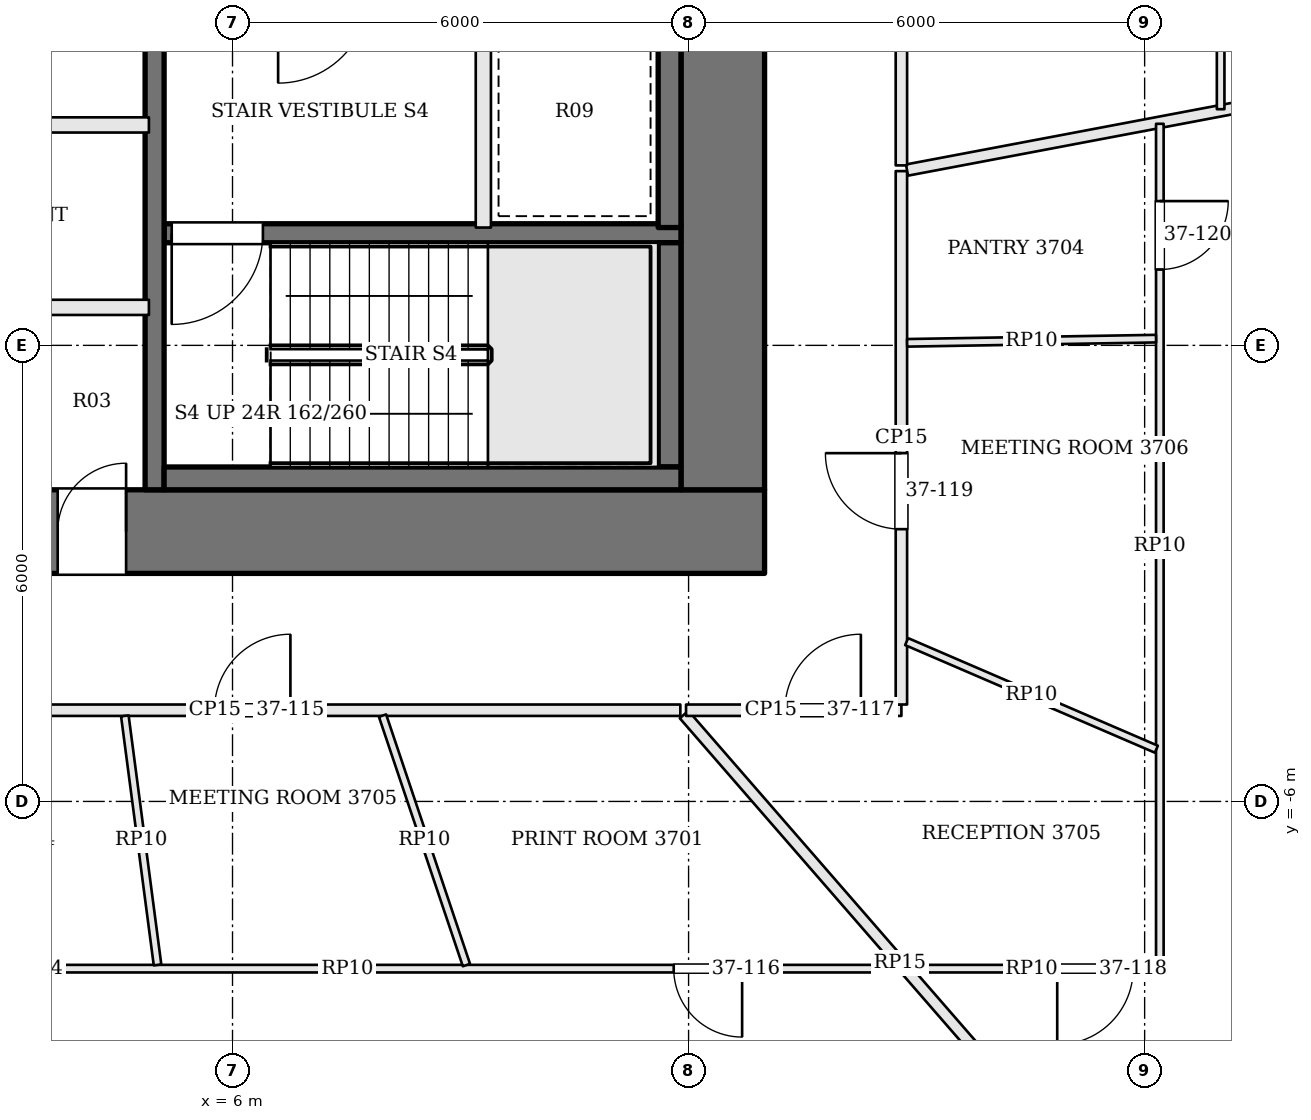
"""IFC4 building model, lengths in metres.
Left out: names, types, materials, properties, quantities, classifications, styles, units other than length and angle.
Written with IfcOpenShell. Run it as: python <this file> out.ifc"""

import sys

from ifc_helpers import new_model, si_unit, direction, frame, frame_2d, origin, place, context, subcontext, project, spatial, rectangle, extrude, element, fill, save


model = new_model("IFC4")
c1 = context("Model", 3, precision=1e-05, world=origin(), true_north=direction((0.0, 1.0)))
c2 = subcontext(c1, "Body", "Model", "MODEL_VIEW")
j1 = project(units=[si_unit("LENGTHUNIT", "METRE"), si_unit("PLANEANGLEUNIT", "RADIAN")], contexts=[c1])
p1 = place(None, origin())
s1 = spatial("IfcSite", under=j1, at=p1, CompositionType="ELEMENT")
p2 = place(p1, origin())
s2 = spatial("IfcBuilding", under=s1, at=p2, CompositionType="ELEMENT")
p3 = place(p2, frame((0.0, 0.0, 153.9)))
s3 = spatial("IfcBuildingStorey", under=s2, at=p3, CompositionType="ELEMENT", Elevation=153.9)
p4 = place(p3, frame((-13.0, -2.45, 0.0), z_axis=(0.0, 0.0, 1.0), x_axis=(1.0, 0.0, 0.0)))
e1 = element("IfcWall", 1, at=p4, inside=s3, PredefinedType="SHEAR", context=c2, shape_type="SweptSolid", body=[
    extrude(rectangle(XDim=26.0, YDim=1.1, at=frame_2d((13.0, 0.0))), origin(), (0.0, 0.0, 1.0), 3.9),
])
p5 = place(p4, frame((9.275, 0.0, 0.0)))
e2 = element("IfcOpeningElement", 2, at=p5, cuts=e1, PredefinedType="OPENING", context=c2, shape_type="SweptSolid", body=[
    extrude(rectangle(XDim=0.9, YDim=2.1, at=frame_2d((0.45, 1.05))), frame((0.0, 0.56, 0.0), z_axis=(0.0, -1.0, 0.0), x_axis=(1.0, 0.0, 0.0)), (0.0, 0.0, 1.0), 1.12),
])
p6 = place(p4, frame((12.525, 0.0, 0.0)))
e3 = element("IfcOpeningElement", 3, at=p6, cuts=e1, PredefinedType="OPENING", context=c2, shape_type="SweptSolid", body=[
    extrude(rectangle(XDim=0.9, YDim=2.1, at=frame_2d((0.45, 1.05))), frame((0.0, 0.56, 0.0), z_axis=(0.0, -1.0, 0.0), x_axis=(1.0, 0.0, 0.0)), (0.0, 0.0, 1.0), 1.12),
])
p7 = place(p4, frame((15.0, 0.0, 0.0)))
e4 = element("IfcOpeningElement", 4, at=p7, cuts=e1, PredefinedType="OPENING", context=c2, shape_type="SweptSolid", body=[
    extrude(rectangle(XDim=1.0, YDim=2.1, at=frame_2d((0.5, 1.05))), frame((0.0, 0.56, 0.0), z_axis=(0.0, -1.0, 0.0), x_axis=(1.0, 0.0, 0.0)), (0.0, 0.0, 1.0), 1.12),
])
p8 = place(p4, frame((16.7, 0.0, 0.0)))
e5 = element("IfcOpeningElement", 5, at=p8, cuts=e1, PredefinedType="OPENING", context=c2, shape_type="SweptSolid", body=[
    extrude(rectangle(XDim=0.9, YDim=2.1, at=frame_2d((0.45, 1.05))), frame((0.0, 0.56, 0.0), z_axis=(0.0, -1.0, 0.0), x_axis=(1.0, 0.0, 0.0)), (0.0, 0.0, 1.0), 1.12),
])
p9 = place(p3, frame((12.45, -1.9, 0.0), z_axis=(0.0, 0.0, 1.0), x_axis=(0.0, 1.0, 0.0)))
e6 = element("IfcWall", 6, at=p9, inside=s3, PredefinedType="SHEAR", context=c2, shape_type="SweptSolid", body=[
    extrude(rectangle(XDim=12.8, YDim=1.1, at=frame_2d((6.4, 0.0))), origin(), (0.0, 0.0, 1.0), 3.9),
])
p10 = place(p9, frame((7.1, 0.0, 0.0)))
e7 = element("IfcOpeningElement", 7, at=p10, cuts=e6, PredefinedType="OPENING", context=c2, shape_type="SweptSolid", body=[
    extrude(rectangle(XDim=1.8, YDim=2.1, at=frame_2d((0.9, 1.05))), frame((0.0, 0.56, 0.0), z_axis=(0.0, -1.0, 0.0), x_axis=(1.0, 0.0, 0.0)), (0.0, 0.0, 1.0), 1.12),
])
p11 = place(p3, frame((11.9, 1.475, 0.0), z_axis=(0.0, 0.0, 1.0), x_axis=(-1.0, 0.0, 0.0)))
e8 = element("IfcWall", 8, at=p11, inside=s3, PredefinedType="SOLIDWALL", context=c2, shape_type="SweptSolid", body=[
    extrude(rectangle(XDim=6.8, YDim=0.25, at=frame_2d((3.4, 0.0))), origin(), (0.0, 0.0, 1.0), 3.7),
])
p12 = place(p11, frame((5.5, 0.0, 0.0)))
e9 = element("IfcOpeningElement", 9, at=p12, cuts=e8, PredefinedType="OPENING", context=c2, shape_type="SweptSolid", body=[
    extrude(rectangle(XDim=1.2, YDim=2.1, at=frame_2d((0.6, 1.05))), frame((0.0, 0.135, 0.0), z_axis=(0.0, -1.0, 0.0), x_axis=(1.0, 0.0, 0.0)), (0.0, 0.0, 1.0), 0.27),
])
p13 = place(p3, frame((9.3, 4.55, 0.0), z_axis=(0.0, 0.0, 1.0), x_axis=(0.0, -1.0, 0.0)))
e10 = element("IfcWall", 10, at=p13, inside=s3, PredefinedType="SOLIDWALL", context=c2, shape_type="SweptSolid", body=[
    extrude(rectangle(XDim=3.0, YDim=0.2, at=frame_2d((1.5, 0.0))), origin(), (0.0, 0.0, 1.0), 3.7),
])
p14 = place(p3, frame((4.975, 10.9, 0.0), z_axis=(0.0, 0.0, 1.0), x_axis=(0.0, -1.0, 0.0)))
e11 = element("IfcWall", 11, at=p14, inside=s3, PredefinedType="SOLIDWALL", context=c2, shape_type="SweptSolid", body=[
    extrude(rectangle(XDim=12.8, YDim=0.25, at=frame_2d((6.4, 0.0))), origin(), (0.0, 0.0, 1.0), 3.7),
])
p15 = place(p14, frame((4.95, 0.0, 0.0)))
e12 = element("IfcOpeningElement", 12, at=p15, cuts=e11, PredefinedType="OPENING", context=c2, shape_type="SweptSolid", body=[
    extrude(rectangle(XDim=1.2, YDim=2.1, at=frame_2d((0.6, 1.05))), frame((0.0, 0.135, 0.0), z_axis=(0.0, -1.0, 0.0), x_axis=(1.0, 0.0, 0.0)), (0.0, 0.0, 1.0), 0.27),
])
p16 = place(p3, frame((11.75, 4.55, 0.0), z_axis=(0.0, 0.0, 1.0), x_axis=(0.0, -1.0, 0.0)))
e13 = element("IfcWall", 13, at=p16, inside=s3, PredefinedType="SOLIDWALL", context=c2, shape_type="SweptSolid", body=[
    extrude(rectangle(XDim=3.0, YDim=0.3, at=frame_2d((1.5, 0.0))), origin(), (0.0, 0.0, 1.0), 3.7),
])
p17 = place(p3, frame((11.75, 1.35, 0.0), z_axis=(0.0, 0.0, 1.0), x_axis=(0.0, -1.0, 0.0)))
e14 = element("IfcWall", 14, at=p17, inside=s3, PredefinedType="SOLIDWALL", context=c2, shape_type="SweptSolid", body=[
    extrude(rectangle(XDim=2.95, YDim=0.3, at=frame_2d((1.475, 0.0))), origin(), (0.0, 0.0, 1.0), 3.7),
])
p18 = place(p3, frame((11.9, -1.75, 0.0), z_axis=(0.0, 0.0, 1.0), x_axis=(-1.0, 0.0, 0.0)))
e15 = element("IfcWall", 15, at=p18, inside=s3, PredefinedType="SOLIDWALL", context=c2, shape_type="SweptSolid", body=[
    extrude(rectangle(XDim=6.8, YDim=0.3, at=frame_2d((3.4, 0.0))), origin(), (0.0, 0.0, 1.0), 3.7),
])
p19 = place(p3, frame((-4.9, 0.5, 0.0), z_axis=(0.0, 0.0, 1.0), x_axis=(1.0, 0.0, 0.0)))
e16 = element("IfcWall", 16, at=p19, inside=s3, PredefinedType="SOLIDWALL", context=c2, shape_type="SweptSolid", body=[
    extrude(rectangle(XDim=9.8, YDim=0.2, at=frame_2d((4.9, 0.0))), origin(), (0.0, 0.0, 1.0), 3.7),
])
p20 = place(p3, frame((-4.9, 2.9, 0.0), z_axis=(0.0, 0.0, 1.0), x_axis=(1.0, 0.0, 0.0)))
e17 = element("IfcWall", 17, at=p20, inside=s3, PredefinedType="SOLIDWALL", context=c2, shape_type="SweptSolid", body=[
    extrude(rectangle(XDim=9.8, YDim=0.2, at=frame_2d((4.9, 0.0))), origin(), (0.0, 0.0, 1.0), 3.7),
])
p21 = place(p20, frame((0.675, 0.0, 0.0)))
e18 = element("IfcOpeningElement", 18, at=p21, cuts=e17, PredefinedType="OPENING", context=c2, shape_type="SweptSolid", body=[
    extrude(rectangle(XDim=1.1, YDim=2.1, at=frame_2d((0.55, 1.05))), frame((0.0, 0.11, 0.0), z_axis=(0.0, -1.0, 0.0), x_axis=(1.0, 0.0, 0.0)), (0.0, 0.0, 1.0), 0.22),
])
p22 = place(p20, frame((2.613, 0.0, 0.0)))
e19 = element("IfcOpeningElement", 19, at=p22, cuts=e17, PredefinedType="OPENING", context=c2, shape_type="SweptSolid", body=[
    extrude(rectangle(XDim=0.9, YDim=2.1, at=frame_2d((0.45, 1.05))), frame((0.0, 0.11, 0.0), z_axis=(0.0, -1.0, 0.0), x_axis=(1.0, 0.0, 0.0)), (0.0, 0.0, 1.0), 0.22),
])
p23 = place(p20, frame((4.35, 0.0, 0.0)))
e20 = element("IfcOpeningElement", 20, at=p23, cuts=e17, PredefinedType="OPENING", context=c2, shape_type="SweptSolid", body=[
    extrude(rectangle(XDim=1.1, YDim=2.1, at=frame_2d((0.55, 1.05))), frame((0.0, 0.11, 0.0), z_axis=(0.0, -1.0, 0.0), x_axis=(1.0, 0.0, 0.0)), (0.0, 0.0, 1.0), 0.22),
])
p24 = place(p20, frame((7.463, 0.0, 0.0)))
e21 = element("IfcOpeningElement", 21, at=p24, cuts=e17, PredefinedType="OPENING", context=c2, shape_type="SweptSolid", body=[
    extrude(rectangle(XDim=1.0, YDim=2.1, at=frame_2d((0.5, 1.05))), frame((0.0, 0.11, 0.0), z_axis=(0.0, -1.0, 0.0), x_axis=(1.0, 0.0, 0.0)), (0.0, 0.0, 1.0), 0.22),
])
p25 = place(p3, frame((0.249, -4.8, 0.0), z_axis=(0.0, 0.0, 1.0), x_axis=(1.0, 0.0, 0.0)))
e22 = element("IfcWall", 22, at=p25, inside=s3, PredefinedType="PARTITIONING", context=c2, shape_type="SweptSolid", body=[
    extrude(rectangle(XDim=11.643, YDim=0.15, at=frame_2d((5.822, 0.0))), origin(), (0.0, 0.0, 1.0), 3.198),
])
p26 = place(p25, frame((1.225, 0.0, 0.0)))
e23 = element("IfcOpeningElement", 23, at=p26, cuts=e22, PredefinedType="OPENING", context=c2, shape_type="SweptSolid", body=[
    extrude(rectangle(XDim=1.8, YDim=2.1, at=frame_2d((0.9, 1.05))), frame((0.0, 0.085, 0.0), z_axis=(0.0, -1.0, 0.0), x_axis=(1.0, 0.0, 0.0)), (0.0, 0.0, 1.0), 0.17),
])
p27 = place(p25, frame((5.513, 0.0, 0.0)))
e24 = element("IfcOpeningElement", 24, at=p27, cuts=e22, PredefinedType="OPENING", context=c2, shape_type="SweptSolid", body=[
    extrude(rectangle(XDim=1.0, YDim=2.4, at=frame_2d((0.5, 1.2))), frame((0.0, 0.085, 0.0), z_axis=(0.0, -1.0, 0.0), x_axis=(1.0, 0.0, 0.0)), (0.0, 0.0, 1.0), 0.17),
])
p28 = place(p3, frame((17.619, -11.385, 0.0), z_axis=(0.0, 0.0, 1.0), x_axis=(-0.656270229344, 0.754525934662, 0.0)))
e25 = element("IfcWall", 25, at=p28, inside=s3, PredefinedType="PARTITIONING", context=c2, shape_type="SweptSolid", body=[
    extrude(rectangle(XDim=8.652, YDim=0.15, at=frame_2d((4.326, 0.0))), origin(), (0.0, 0.0, 1.0), 3.198),
])
p29 = place(p3, frame((11.967, -4.8, 0.0), z_axis=(0.0, 0.0, 1.0), x_axis=(1.0, 0.0, 0.0)))
e26 = element("IfcWall", 26, at=p29, inside=s3, PredefinedType="PARTITIONING", context=c2, shape_type="SweptSolid", body=[
    extrude(rectangle(XDim=2.833, YDim=0.15, at=frame_2d((1.417, 0.0))), origin(), (0.0, 0.0, 1.0), 3.198),
])
p30 = place(p29, frame((1.3, 0.0, 0.0)))
e27 = element("IfcOpeningElement", 27, at=p30, cuts=e26, PredefinedType="OPENING", context=c2, shape_type="SweptSolid", body=[
    extrude(rectangle(XDim=1.0, YDim=2.1, at=frame_2d((0.5, 1.05))), frame((0.0, 0.085, 0.0), z_axis=(0.0, -1.0, 0.0), x_axis=(1.0, 0.0, 0.0)), (0.0, 0.0, 1.0), 0.17),
])
p31 = place(p3, frame((14.8, -4.725, 0.0), z_axis=(0.0, 0.0, 1.0), x_axis=(0.0, 1.0, 0.0)))
e28 = element("IfcWall", 28, at=p31, inside=s3, PredefinedType="PARTITIONING", context=c2, shape_type="SweptSolid", body=[
    extrude(rectangle(XDim=7.018, YDim=0.15, at=frame_2d((3.509, 0.0))), origin(), (0.0, 0.0, 1.0), 3.198),
])
p32 = place(p31, frame((2.307, 0.0, 0.0)))
e29 = element("IfcOpeningElement", 29, at=p32, cuts=e28, PredefinedType="OPENING", context=c2, shape_type="SweptSolid", body=[
    extrude(rectangle(XDim=1.0, YDim=2.4, at=frame_2d((0.5, 1.2))), frame((0.0, 0.085, 0.0), z_axis=(0.0, -1.0, 0.0), x_axis=(1.0, 0.0, 0.0)), (0.0, 0.0, 1.0), 0.17),
])
p33 = place(p3, frame((25.092, 4.238, 0.0), z_axis=(0.0, 0.0, 1.0), x_axis=(-0.98259573428, -0.185756892135, 0.0)))
e30 = element("IfcWall", 30, at=p33, inside=s3, PredefinedType="PARTITIONING", context=c2, shape_type="SweptSolid", body=[
    extrude(rectangle(XDim=10.399, YDim=0.15, at=frame_2d((5.199, 0.0))), origin(), (0.0, 0.0, 1.0), 3.198),
])
p34 = place(p3, frame((14.8, 2.368, 0.0), z_axis=(0.0, 0.0, 1.0), x_axis=(0.0, 1.0, 0.0)))
e31 = element("IfcWall", 31, at=p34, inside=s3, PredefinedType="PARTITIONING", context=c2, shape_type="SweptSolid", body=[
    extrude(rectangle(XDim=12.359, YDim=0.15, at=frame_2d((6.18, 0.0))), origin(), (0.0, 0.0, 1.0), 3.198),
])
p35 = place(p34, frame((2.057, 0.0, 0.0)))
e32 = element("IfcOpeningElement", 32, at=p35, cuts=e31, PredefinedType="OPENING", context=c2, shape_type="SweptSolid", body=[
    extrude(rectangle(XDim=1.8, YDim=2.1, at=frame_2d((0.9, 1.05))), frame((0.0, 0.085, 0.0), z_axis=(0.0, -1.0, 0.0), x_axis=(1.0, 0.0, 0.0)), (0.0, 0.0, 1.0), 0.17),
])
p36 = place(p34, frame((8.465, 0.0, 0.0)))
e33 = element("IfcOpeningElement", 33, at=p36, cuts=e31, PredefinedType="OPENING", context=c2, shape_type="SweptSolid", body=[
    extrude(rectangle(XDim=1.0, YDim=2.4, at=frame_2d((0.5, 1.2))), frame((0.0, 0.085, 0.0), z_axis=(0.0, -1.0, 0.0), x_axis=(1.0, 0.0, 0.0)), (0.0, 0.0, 1.0), 0.17),
])
p37 = place(p3, frame((14.823, -8.2, 0.0), z_axis=(0.0, 0.0, 1.0), x_axis=(-1.0, 0.0, 0.0)))
e34 = element("IfcWall", 34, at=p37, inside=s3, PredefinedType="PARTITIONING", context=c2, shape_type="SweptSolid", body=[
    extrude(rectangle(XDim=14.622, YDim=0.1, at=frame_2d((7.311, 0.0))), origin(), (0.0, 0.0, 1.0), 3.184),
])
p38 = place(p37, frame((11.504, 0.0, 0.0)))
e35 = element("IfcOpeningElement", 35, at=p38, cuts=e34, PredefinedType="OPENING", context=c2, shape_type="SweptSolid", body=[
    extrude(rectangle(XDim=1.0, YDim=2.1, at=frame_2d((0.5, 1.05))), frame((0.0, 0.06, 0.0), z_axis=(0.0, -1.0, 0.0), x_axis=(1.0, 0.0, 0.0)), (0.0, 0.0, 1.0), 0.12),
])
p39 = place(p37, frame((2.118, 0.0, 0.0)))
e36 = element("IfcOpeningElement", 36, at=p39, cuts=e34, PredefinedType="OPENING", context=c2, shape_type="SweptSolid", body=[
    extrude(rectangle(XDim=0.9, YDim=2.1, at=frame_2d((0.45, 1.05))), frame((0.0, 0.06, 0.0), z_axis=(0.0, -1.0, 0.0), x_axis=(1.0, 0.0, 0.0)), (0.0, 0.0, 1.0), 0.12),
])
p40 = place(p3, frame((4.583, -4.875, 0.0), z_axis=(0.0, 0.0, 1.0), x_axis=(0.130125733959, -0.991497500431, 0.0)))
e37 = element("IfcWall", 37, at=p40, inside=s3, PredefinedType="PARTITIONING", context=c2, shape_type="SweptSolid", body=[
    extrude(rectangle(XDim=3.304, YDim=0.1, at=frame_2d((1.652, 0.0))), origin(), (0.0, 0.0, 1.0), 3.184),
])
p41 = place(p3, frame((7.974, -4.871, 0.0), z_axis=(0.0, 0.0, 1.0), x_axis=(0.318807519281, -0.947819479463, 0.0)))
e38 = element("IfcWall", 38, at=p41, inside=s3, PredefinedType="PARTITIONING", context=c2, shape_type="SweptSolid", body=[
    extrude(rectangle(XDim=3.462, YDim=0.1, at=frame_2d((1.731, 0.0))), origin(), (0.0, 0.0, 1.0), 3.184),
])
p42 = place(p3, frame((18.2, 2.915, 0.0), z_axis=(0.0, 0.0, 1.0), x_axis=(0.0, -1.0, 0.0)))
e39 = element("IfcWall", 39, at=p42, inside=s3, PredefinedType="PARTITIONING", context=c2, shape_type="SweptSolid", body=[
    extrude(rectangle(XDim=11.115, YDim=0.1, at=frame_2d((5.558, 0.0))), origin(), (0.0, 0.0, 1.0), 3.184),
])
p43 = place(p42, frame((1.017, 0.0, 0.0)))
e40 = element("IfcOpeningElement", 40, at=p43, cuts=e39, PredefinedType="OPENING", context=c2, shape_type="SweptSolid", body=[
    extrude(rectangle(XDim=0.9, YDim=2.1, at=frame_2d((0.45, 1.05))), frame((0.0, 0.06, 0.0), z_axis=(0.0, -1.0, 0.0), x_axis=(1.0, 0.0, 0.0)), (0.0, 0.0, 1.0), 0.12),
])
p44 = place(p3, frame((18.15, -8.2, 0.0), z_axis=(0.0, 0.0, 1.0), x_axis=(-1.0, 0.0, 0.0)))
e41 = element("IfcWall", 41, at=p44, inside=s3, PredefinedType="PARTITIONING", context=c2, shape_type="SweptSolid", body=[
    extrude(rectangle(XDim=3.274, YDim=0.1, at=frame_2d((1.637, 0.0))), origin(), (0.0, 0.0, 1.0), 3.184),
])
p45 = place(p44, frame((0.3, 0.0, 0.0)))
e42 = element("IfcOpeningElement", 42, at=p45, cuts=e41, PredefinedType="OPENING", context=c2, shape_type="SweptSolid", body=[
    extrude(rectangle(XDim=1.0, YDim=2.1, at=frame_2d((0.5, 1.05))), frame((0.0, 0.06, 0.0), z_axis=(0.0, -1.0, 0.0), x_axis=(1.0, 0.0, 0.0)), (0.0, 0.0, 1.0), 0.12),
])
p46 = place(p3, frame((14.869, -3.897, 0.0), z_axis=(0.0, 0.0, 1.0), x_axis=(0.918373696942, -0.395714231188, 0.0)))
e43 = element("IfcWall", 43, at=p46, inside=s3, PredefinedType="PARTITIONING", context=c2, shape_type="SweptSolid", body=[
    extrude(rectangle(XDim=3.577, YDim=0.1, at=frame_2d((1.789, 0.0))), origin(), (0.0, 0.0, 1.0), 3.184),
])
p47 = place(p3, frame((14.875, 0.033, 0.0), z_axis=(0.0, 0.0, 1.0), x_axis=(0.999856843244, 0.016920195573, 0.0)))
e44 = element("IfcWall", 44, at=p47, inside=s3, PredefinedType="PARTITIONING", context=c2, shape_type="SweptSolid", body=[
    extrude(rectangle(XDim=3.275, YDim=0.1, at=frame_2d((1.638, 0.0))), origin(), (0.0, 0.0, 1.0), 3.184),
])
p48 = place(p3, frame((19.0, 13.27, 0.0), z_axis=(0.0, 0.0, 1.0), x_axis=(0.0, -1.0, 0.0)))
e45 = element("IfcWall", 45, at=p48, inside=s3, PredefinedType="PARTITIONING", context=c2, shape_type="SweptSolid", body=[
    extrude(rectangle(XDim=10.163, YDim=0.1, at=frame_2d((5.082, 0.0))), origin(), (0.0, 0.0, 1.0), 3.184),
])
p49 = place(p48, frame((5.648, 0.0, 0.0)))
e46 = element("IfcOpeningElement", 46, at=p49, cuts=e45, PredefinedType="OPENING", context=c2, shape_type="SweptSolid", body=[
    extrude(rectangle(XDim=1.0, YDim=2.1, at=frame_2d((0.5, 1.05))), frame((0.0, 0.06, 0.0), z_axis=(0.0, -1.0, 0.0), x_axis=(1.0, 0.0, 0.0)), (0.0, 0.0, 1.0), 0.12),
])
p50 = place(p12, origin())
e47 = element("IfcDoor", 47, at=p50, inside=s3, OperationType="SINGLE_SWING_RIGHT", PredefinedType="DOOR", context=c2, shape_type="SweptSolid", body=[
    extrude(rectangle(XDim=1.2, YDim=2.1, at=frame_2d((0.6, 1.05))), frame((0.0, 0.025, 0.0), z_axis=(0.0, -1.0, 0.0), x_axis=(1.0, 0.0, 0.0)), (0.0, 0.0, 1.0), 0.05),
])
fill(e9, e47)
p51 = place(p8, origin())
e48 = element("IfcDoor", 48, at=p51, inside=s3, OperationType="SINGLE_SWING_RIGHT", PredefinedType="DOOR", context=c2, shape_type="SweptSolid", body=[
    extrude(rectangle(XDim=0.9, YDim=2.1, at=frame_2d((0.45, 1.05))), frame((0.0, 0.025, 0.0), z_axis=(0.0, -1.0, 0.0), x_axis=(1.0, 0.0, 0.0)), (0.0, 0.0, 1.0), 0.05),
])
fill(e5, e48)
p52 = place(p27, origin())
e49 = element("IfcDoor", 49, at=p52, inside=s3, OperationType="SINGLE_SWING_RIGHT", PredefinedType="DOOR", context=c2, shape_type="SweptSolid", body=[
    extrude(rectangle(XDim=1.0, YDim=2.4, at=frame_2d((0.5, 1.2))), frame((0.0, 0.025, 0.0), z_axis=(0.0, -1.0, 0.0), x_axis=(1.0, 0.0, 0.0)), (0.0, 0.0, 1.0), 0.05),
])
fill(e24, e49)
p53 = place(p39, origin())
e50 = element("IfcDoor", 50, at=p53, inside=s3, OperationType="SINGLE_SWING_LEFT", PredefinedType="DOOR", context=c2, shape_type="SweptSolid", body=[
    extrude(rectangle(XDim=0.9, YDim=2.1, at=frame_2d((0.45, 1.05))), frame((0.0, 0.025, 0.0), z_axis=(0.0, -1.0, 0.0), x_axis=(1.0, 0.0, 0.0)), (0.0, 0.0, 1.0), 0.05),
])
fill(e36, e50)
p54 = place(p30, origin())
e51 = element("IfcDoor", 51, at=p54, inside=s3, OperationType="SINGLE_SWING_RIGHT", PredefinedType="DOOR", context=c2, shape_type="SweptSolid", body=[
    extrude(rectangle(XDim=1.0, YDim=2.1, at=frame_2d((0.5, 1.05))), frame((0.0, 0.025, 0.0), z_axis=(0.0, -1.0, 0.0), x_axis=(1.0, 0.0, 0.0)), (0.0, 0.0, 1.0), 0.05),
])
fill(e27, e51)
p55 = place(p45, origin())
e52 = element("IfcDoor", 52, at=p55, inside=s3, OperationType="SINGLE_SWING_RIGHT", PredefinedType="DOOR", context=c2, shape_type="SweptSolid", body=[
    extrude(rectangle(XDim=1.0, YDim=2.1, at=frame_2d((0.5, 1.05))), frame((0.0, 0.025, 0.0), z_axis=(0.0, -1.0, 0.0), x_axis=(1.0, 0.0, 0.0)), (0.0, 0.0, 1.0), 0.05),
])
fill(e42, e52)
p56 = place(p32, origin())
e53 = element("IfcDoor", 53, at=p56, inside=s3, OperationType="SINGLE_SWING_RIGHT", PredefinedType="DOOR", context=c2, shape_type="SweptSolid", body=[
    extrude(rectangle(XDim=1.0, YDim=2.4, at=frame_2d((0.5, 1.2))), frame((0.0, 0.025, 0.0), z_axis=(0.0, -1.0, 0.0), x_axis=(1.0, 0.0, 0.0)), (0.0, 0.0, 1.0), 0.05),
])
fill(e29, e53)
p57 = place(p43, origin())
e54 = element("IfcDoor", 54, at=p57, inside=s3, OperationType="SINGLE_SWING_LEFT", PredefinedType="DOOR", context=c2, shape_type="SweptSolid", body=[
    extrude(rectangle(XDim=0.9, YDim=2.1, at=frame_2d((0.45, 1.05))), frame((0.0, 0.025, 0.0), z_axis=(0.0, -1.0, 0.0), x_axis=(1.0, 0.0, 0.0)), (0.0, 0.0, 1.0), 0.05),
])
fill(e40, e54)
save(model, sys.argv[1])
